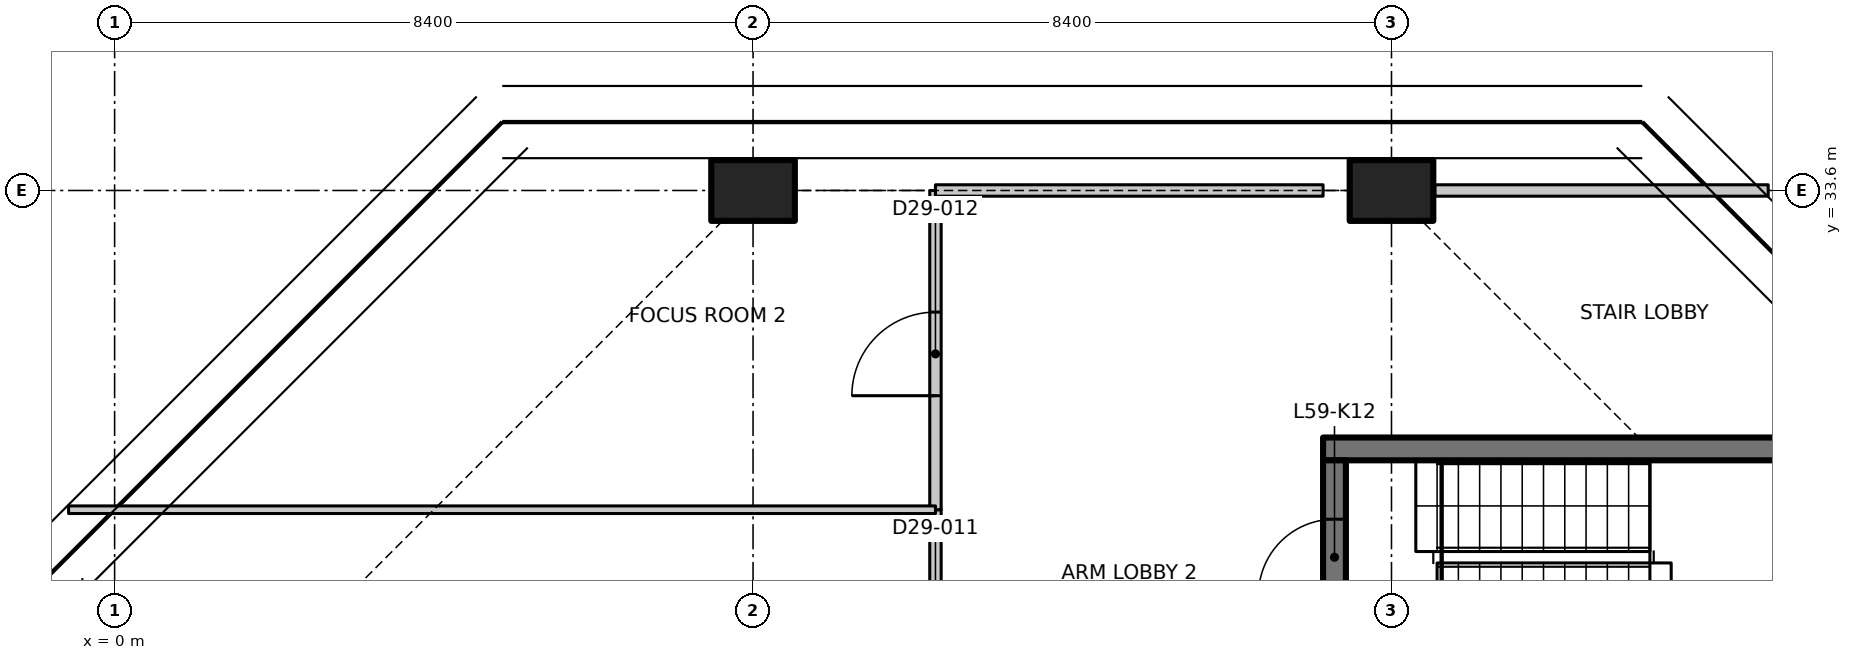
"""IFC4 building model, lengths in metres.
Left out: names, types, materials, properties, quantities, classifications, styles, units other than length and angle.
Written with IfcOpenShell. Run it as: python <this file> out.ifc"""

import sys

from ifc_helpers import new_model, si_unit, direction, frame, frame_2d, origin, origin_2d, place, context, subcontext, project, spatial, polyline, rectangle, outline, extrude, element, fill, save


model = new_model("IFC4")
c1 = context("Model", 3, precision=1e-05, world=origin(), true_north=direction((0.0, 1.0)))
c2 = subcontext(c1, "Body", "Model", "MODEL_VIEW")
j1 = project(units=[si_unit("LENGTHUNIT", "METRE"), si_unit("PLANEANGLEUNIT", "RADIAN")], contexts=[c1])
p1 = place(None, origin())
s1 = spatial("IfcSite", under=j1, at=p1, CompositionType="ELEMENT")
p2 = place(p1, origin())
s2 = spatial("IfcBuilding", under=s1, at=p2, CompositionType="ELEMENT")
p3 = place(p2, frame((0.0, 0.0, 233.7)))
s3 = spatial("IfcBuildingStorey", under=s2, at=p3, CompositionType="ELEMENT", Elevation=233.7)
for number, where, z_axis, x_axis in (
    (1, (8.4, 33.6, 0.0), (0.0, 0.0, 1.0), (0.0, 1.0, 0.0)),
    (2, (16.8, 33.6, 0.0), (0.0, 0.0, 1.0), (0.0, 1.0, 0.0)),
):
    element("IfcColumn", number, at=place(p3, frame(where, z_axis=z_axis, x_axis=x_axis)), inside=s3, PredefinedType="COLUMN", context=c2, shape_type="SweptSolid", body=[
        extrude(rectangle(XDim=0.8, YDim=1.1, at=origin_2d()), origin(), (0.0, 0.0, 1.0), 3.35),
    ])
p4 = place(p3, frame((15.9, 30.2, 0.0), z_axis=(0.0, 0.0, 1.0), x_axis=(1.0, 0.0, 0.0)))
e3 = element("IfcWall", 3, at=p4, inside=s3, PredefinedType="SHEAR", context=c2, shape_type="SweptSolid", body=[
    extrude(rectangle(XDim=8.2, YDim=0.3, at=frame_2d((4.1, 0.0))), origin(), (0.0, 0.0, 1.0), 3.35),
])
p5 = place(p3, frame((16.05, 27.5, 0.0), z_axis=(0.0, 0.0, 1.0), x_axis=(0.0, 1.0, 0.0)))
e4 = element("IfcWall", 4, at=p5, inside=s3, PredefinedType="SHEAR", context=c2, shape_type="SweptSolid", body=[
    extrude(rectangle(XDim=2.55, YDim=0.3, at=frame_2d((1.275, 0.0))), origin(), (0.0, 0.0, 1.0), 3.35),
])
p6 = place(p5, frame((0.775, 0.0, 0.0)))
e5 = element("IfcOpeningElement", 5, at=p6, cuts=e4, PredefinedType="OPENING", context=c2, shape_type="SweptSolid", body=[
    extrude(rectangle(XDim=1.0, YDim=2.1, at=frame_2d((0.5, 1.05))), frame((0.0, 0.16, 0.0), z_axis=(0.0, -1.0, 0.0), x_axis=(1.0, 0.0, 0.0)), (0.0, 0.0, 1.0), 0.32),
])
p7 = place(p3, frame((10.8, 25.2, 0.0), z_axis=(0.0, 0.0, 1.0), x_axis=(0.0, 1.0, 0.0)))
e6 = element("IfcWall", 6, at=p7, inside=s3, PredefinedType="PARTITIONING", context=c2, shape_type="SweptSolid", body=[
    extrude(rectangle(XDim=4.2, YDim=0.15, at=frame_2d((2.1, 0.0))), origin(), (0.0, 0.0, 1.0), 3.33),
])
p8 = place(p7, frame((1.5, 0.0, 0.0)))
e7 = element("IfcOpeningElement", 7, at=p8, cuts=e6, PredefinedType="OPENING", context=c2, shape_type="SweptSolid", body=[
    extrude(rectangle(XDim=1.1, YDim=2.1, at=frame_2d((0.55, 1.05))), frame((0.0, 0.085, 0.0), z_axis=(0.0, -1.0, 0.0), x_axis=(1.0, 0.0, 0.0)), (0.0, 0.0, 1.0), 0.17),
])
p9 = place(p3, frame((10.8, 29.4, 0.0), z_axis=(0.0, 0.0, 1.0), x_axis=(0.0, 1.0, 0.0)))
e8 = element("IfcWall", 8, at=p9, inside=s3, PredefinedType="PARTITIONING", context=c2, shape_type="SweptSolid", body=[
    extrude(rectangle(XDim=4.2, YDim=0.15, at=frame_2d((2.1, 0.0))), origin(), (0.0, 0.0, 1.0), 2.98),
])
p10 = place(p9, frame((1.5, 0.0, 0.0)))
e9 = element("IfcOpeningElement", 9, at=p10, cuts=e8, PredefinedType="OPENING", context=c2, shape_type="SweptSolid", body=[
    extrude(rectangle(XDim=1.1, YDim=2.1, at=frame_2d((0.55, 1.05))), frame((0.0, 0.085, 0.0), z_axis=(0.0, -1.0, 0.0), x_axis=(1.0, 0.0, 0.0)), (0.0, 0.0, 1.0), 0.17),
])
p11 = place(p3, frame((10.8, 33.6, 0.0), z_axis=(0.0, 0.0, 1.0), x_axis=(1.0, 0.0, 0.0)))
e10 = element("IfcWall", 10, at=p11, inside=s3, PredefinedType="PARTITIONING", context=c2, shape_type="SweptSolid", body=[
    extrude(outline(polyline([(0.0, 0.0), (5.1, 0.0), (5.1, 2.98), (0.0, 2.98), (0.0, 0.0)])), frame((0.0, 0.075, 0.0), z_axis=(0.0, -1.0, 0.0), x_axis=(1.0, 0.0, 0.0)), (0.0, 0.0, 1.0), 0.15),
])
p12 = place(p3, frame((17.37, 33.6, 0.0), z_axis=(0.0, 0.0, 1.0), x_axis=(1.0, 0.0, 0.0)))
e11 = element("IfcWall", 11, at=p12, inside=s3, PredefinedType="PARTITIONING", context=c2, shape_type="SweptSolid", body=[
    extrude(rectangle(XDim=4.386, YDim=0.15, at=frame_2d((2.193, 0.0))), origin(), (0.0, 0.0, 1.0), 2.98),
])
p13 = place(p3, frame((-0.605, 29.4, 0.0), z_axis=(0.0, 0.0, 1.0), x_axis=(1.0, 0.0, 0.0)))
e12 = element("IfcWall", 12, at=p13, inside=s3, PredefinedType="PARTITIONING", context=c2, shape_type="SweptSolid", body=[
    extrude(outline(polyline([(0.0, 0.0), (11.406, 0.0), (11.406, 3.33), (5.471, 3.33), (5.469, 2.98), (4.142, 2.98), (4.14, 3.33), (0.406, 3.33), (0.0, 3.33), (0.0, 0.0)])), frame((0.0, 0.05, 0.0), z_axis=(0.0, -1.0, 0.0), x_axis=(1.0, 0.0, 0.0)), (0.0, 0.0, 1.0), 0.1),
])
p14 = place(p6, origin())
e13 = element("IfcDoor", 13, at=p14, inside=s3, OperationType="SINGLE_SWING_LEFT", PredefinedType="DOOR", context=c2, shape_type="SweptSolid", body=[
    extrude(rectangle(XDim=1.0, YDim=2.1, at=frame_2d((0.5, 1.05))), frame((0.0, 0.025, 0.0), z_axis=(0.0, -1.0, 0.0), x_axis=(1.0, 0.0, 0.0)), (0.0, 0.0, 1.0), 0.05),
])
fill(e5, e13)
p15 = place(p10, origin())
e14 = element("IfcDoor", 14, at=p15, inside=s3, OperationType="SINGLE_SWING_LEFT", PredefinedType="DOOR", context=c2, shape_type="SweptSolid", body=[
    extrude(rectangle(XDim=1.1, YDim=2.1, at=frame_2d((0.55, 1.05))), frame((0.0, 0.025, 0.0), z_axis=(0.0, -1.0, 0.0), x_axis=(1.0, 0.0, 0.0)), (0.0, 0.0, 1.0), 0.05),
])
fill(e9, e14)
save(model, sys.argv[1])
